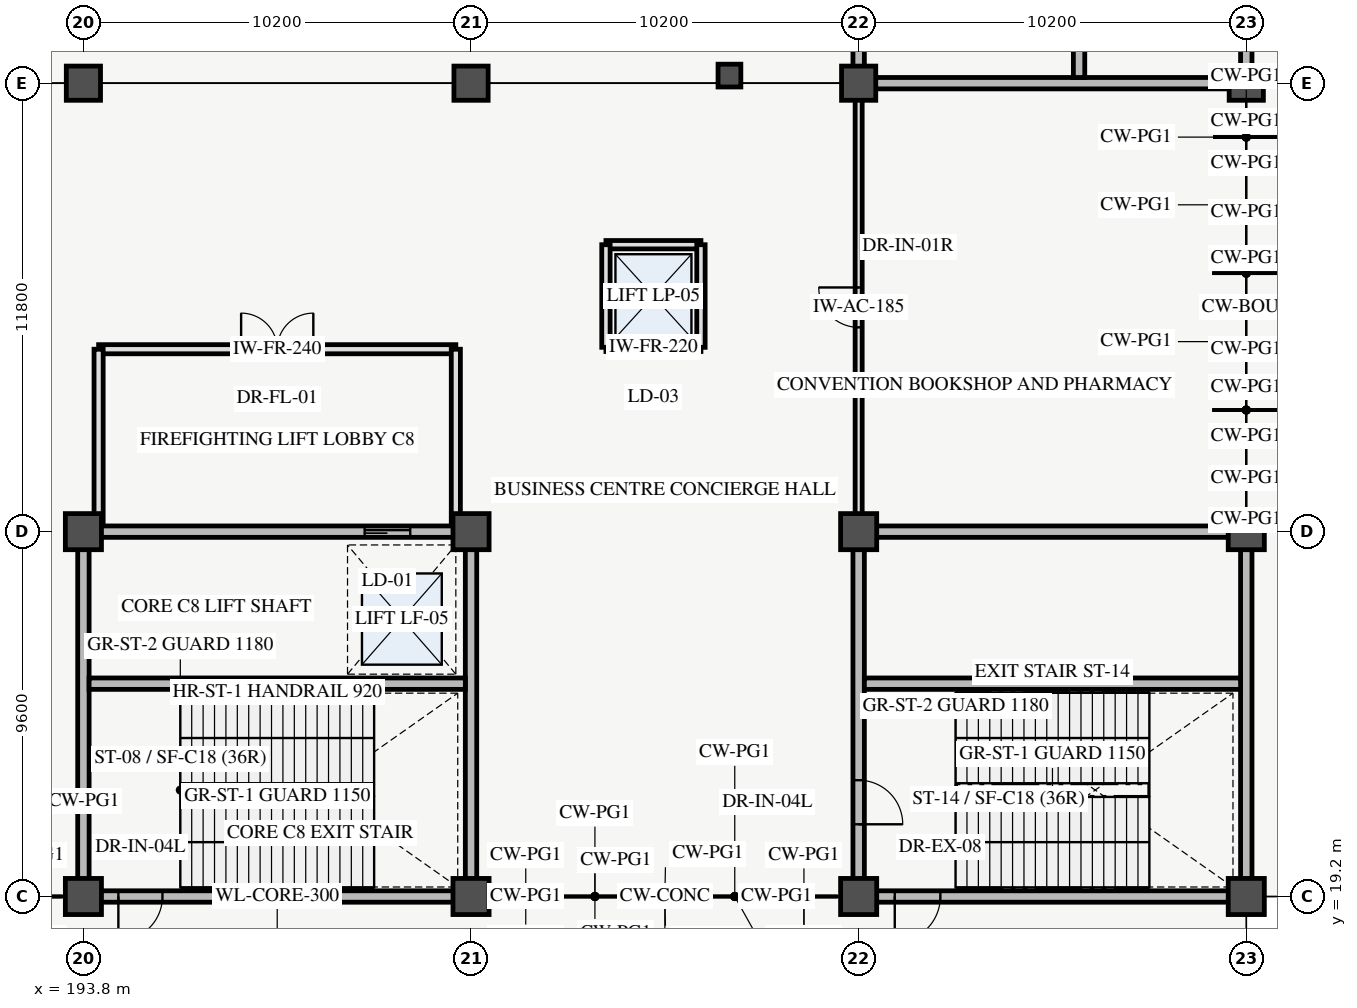
"""IFC4 building model, lengths in metres.
Left out: names, types, materials, properties, quantities, classifications, styles, units other than length and angle.
Written with IfcOpenShell. Run it as: python <this file> out.ifc"""

import sys

from ifc_helpers import new_model, si_unit, direction, frame, frame_2d, origin, origin_2d, place, context, subcontext, project, spatial, rectangle, extrude, element, fill, save


model = new_model("IFC4")
c1 = context("Model", 3, precision=1e-05, world=origin(), true_north=direction((0.0, 1.0)))
c2 = subcontext(c1, "Body", "Model", "MODEL_VIEW")
j1 = project(units=[si_unit("LENGTHUNIT", "METRE"), si_unit("PLANEANGLEUNIT", "RADIAN")], contexts=[c1])
p1 = place(None, origin())
s1 = spatial("IfcSite", under=j1, at=p1, CompositionType="ELEMENT")
p2 = place(p1, origin())
s2 = spatial("IfcBuilding", under=s1, at=p2, CompositionType="ELEMENT")
p3 = place(p2, origin())
s3 = spatial("IfcBuildingStorey", under=s2, at=p3, CompositionType="ELEMENT", Elevation=0.0)
for number, where, z_axis, x_axis in (
    (1, (193.8, 19.2, 0.0), (0.0, 0.0, 1.0), (1.0, 0.0, 0.0)),
    (2, (193.8, 28.8, 0.0), (0.0, 0.0, 1.0), (1.0, 0.0, 0.0)),
):
    element("IfcColumn", number, at=place(p3, frame(where, z_axis=z_axis, x_axis=x_axis)), inside=s3, PredefinedType="COLUMN", context=c2, shape_type="SweptSolid", body=[
        extrude(rectangle(XDim=0.95, YDim=0.95, at=origin_2d()), origin(), (0.0, 0.0, 1.0), 5.4),
    ])
p4 = place(p3, frame((193.8, 40.6, 0.0), z_axis=(0.0, 0.0, 1.0), x_axis=(1.0, 0.0, 0.0)))
e3 = element("IfcColumn", 3, at=p4, inside=s3, PredefinedType="COLUMN", context=c2, shape_type="SweptSolid", body=[
    extrude(rectangle(XDim=0.9, YDim=0.9, at=origin_2d()), origin(), (0.0, 0.0, 1.0), 5.4),
])
for number, where, z_axis, x_axis in (
    (4, (204.0, 19.2, 0.0), (0.0, 0.0, 1.0), (1.0, 0.0, 0.0)),
    (5, (204.0, 28.8, 0.0), (0.0, 0.0, 1.0), (1.0, 0.0, 0.0)),
):
    element("IfcColumn", number, at=place(p3, frame(where, z_axis=z_axis, x_axis=x_axis)), inside=s3, PredefinedType="COLUMN", context=c2, shape_type="SweptSolid", body=[
        extrude(rectangle(XDim=0.95, YDim=0.95, at=origin_2d()), origin(), (0.0, 0.0, 1.0), 5.4),
    ])
p5 = place(p3, frame((204.0, 40.6, 0.0), z_axis=(0.0, 0.0, 1.0), x_axis=(1.0, 0.0, 0.0)))
e6 = element("IfcColumn", 6, at=p5, inside=s3, PredefinedType="COLUMN", context=c2, shape_type="SweptSolid", body=[
    extrude(rectangle(XDim=0.9, YDim=0.9, at=origin_2d()), origin(), (0.0, 0.0, 1.0), 5.4),
])
for number, where, z_axis, x_axis in (
    (7, (214.2, 19.2, 0.0), (0.0, 0.0, 1.0), (1.0, 0.0, 0.0)),
    (8, (214.2, 28.8, 0.0), (0.0, 0.0, 1.0), (1.0, 0.0, 0.0)),
):
    element("IfcColumn", number, at=place(p3, frame(where, z_axis=z_axis, x_axis=x_axis)), inside=s3, PredefinedType="COLUMN", context=c2, shape_type="SweptSolid", body=[
        extrude(rectangle(XDim=0.95, YDim=0.95, at=origin_2d()), origin(), (0.0, 0.0, 1.0), 5.4),
    ])
p6 = place(p3, frame((214.2, 40.6, 0.0), z_axis=(0.0, 0.0, 1.0), x_axis=(1.0, 0.0, 0.0)))
e9 = element("IfcColumn", 9, at=p6, inside=s3, PredefinedType="COLUMN", context=c2, shape_type="SweptSolid", body=[
    extrude(rectangle(XDim=0.9, YDim=0.9, at=origin_2d()), origin(), (0.0, 0.0, 1.0), 5.4),
])
for number, where, z_axis, x_axis in (
    (10, (224.4, 19.2, 0.0), (0.0, 0.0, 1.0), (1.0, 0.0, 0.0)),
    (11, (224.4, 28.8, 0.0), (0.0, 0.0, 1.0), (1.0, 0.0, 0.0)),
):
    element("IfcColumn", number, at=place(p3, frame(where, z_axis=z_axis, x_axis=x_axis)), inside=s3, PredefinedType="COLUMN", context=c2, shape_type="SweptSolid", body=[
        extrude(rectangle(XDim=0.95, YDim=0.95, at=origin_2d()), origin(), (0.0, 0.0, 1.0), 5.4),
    ])
p7 = place(p3, frame((224.4, 40.6, 0.0), z_axis=(0.0, 0.0, 1.0), x_axis=(1.0, 0.0, 0.0)))
e12 = element("IfcColumn", 12, at=p7, inside=s3, PredefinedType="COLUMN", context=c2, shape_type="SweptSolid", body=[
    extrude(rectangle(XDim=0.9, YDim=0.9, at=origin_2d()), origin(), (0.0, 0.0, 1.0), 5.4),
])
p8 = place(p3, frame((193.8, 19.2, 0.0), z_axis=(0.0, 0.0, 1.0), x_axis=(1.0, 0.0, 0.0)))
e13 = element("IfcWall", 13, at=p8, inside=s3, PredefinedType="SHEAR", context=c2, shape_type="SweptSolid", body=[
    extrude(rectangle(XDim=10.2, YDim=0.3, at=frame_2d((5.1, 0.0))), origin(), (0.0, 0.0, 1.0), 5.4),
])
p9 = place(p8, frame((0.92, 0.0, 0.0)))
e14 = element("IfcOpeningElement", 14, at=p9, cuts=e13, PredefinedType="OPENING", context=c2, shape_type="SweptSolid", body=[
    extrude(rectangle(XDim=1.16, YDim=2.2, at=frame_2d((0.58, 1.1))), frame((0.0, 0.16, 0.0), z_axis=(0.0, -1.0, 0.0), x_axis=(1.0, 0.0, 0.0)), (0.0, 0.0, 1.0), 0.32),
])
p10 = place(p3, frame((193.8, 28.8, 0.0), z_axis=(0.0, 0.0, 1.0), x_axis=(1.0, 0.0, 0.0)))
e15 = element("IfcWall", 15, at=p10, inside=s3, PredefinedType="SHEAR", context=c2, shape_type="SweptSolid", body=[
    extrude(rectangle(XDim=10.2, YDim=0.3, at=frame_2d((5.1, 0.0))), origin(), (0.0, 0.0, 1.0), 5.4),
])
p11 = place(p10, frame((7.4, 0.0, 0.0)))
e16 = element("IfcOpeningElement", 16, at=p11, cuts=e15, PredefinedType="OPENING", context=c2, shape_type="SweptSolid", body=[
    extrude(rectangle(XDim=1.2, YDim=2.25, at=frame_2d((0.6, 1.125))), frame((0.0, 0.16, 0.0), z_axis=(0.0, -1.0, 0.0), x_axis=(1.0, 0.0, 0.0)), (0.0, 0.0, 1.0), 0.32),
])
for number, where, z_axis, x_axis in (
    (17, (193.8, 19.2, 0.0), (0.0, 0.0, 1.0), (0.0, 1.0, 0.0)),
    (18, (204.0, 19.2, 0.0), (0.0, 0.0, 1.0), (0.0, 1.0, 0.0)),
):
    element("IfcWall", number, at=place(p3, frame(where, z_axis=z_axis, x_axis=x_axis)), inside=s3, PredefinedType="SHEAR", context=c2, shape_type="SweptSolid", body=[
        extrude(rectangle(XDim=9.6, YDim=0.3, at=frame_2d((4.8, 0.0))), origin(), (0.0, 0.0, 1.0), 5.4),
    ])
p12 = place(p3, frame((210.8, 40.8, 0.0), z_axis=(0.0, 0.0, 1.0), x_axis=(1.0, 0.0, 0.0)))
e19 = element("IfcColumn", 19, at=p12, inside=s3, PredefinedType="COLUMN", context=c2, shape_type="SweptSolid", body=[
    extrude(rectangle(XDim=0.6, YDim=0.6, at=origin_2d()), origin(), (0.0, 0.0, 1.0), 5.08),
])
p13 = place(p3, frame((193.95, 24.8, 0.0), z_axis=(0.0, 0.0, 1.0), x_axis=(1.0, 0.0, 0.0)))
e20 = element("IfcWall", 20, at=p13, inside=s3, PredefinedType="SHEAR", context=c2, shape_type="SweptSolid", body=[
    extrude(rectangle(XDim=9.9, YDim=0.3, at=frame_2d((4.95, 0.0))), origin(), (0.0, 0.0, 1.0), 5.4),
])
p14 = place(p3, frame((214.2, 19.2, 0.0), z_axis=(0.0, 0.0, 1.0), x_axis=(1.0, 0.0, 0.0)))
e21 = element("IfcWall", 21, at=p14, inside=s3, PredefinedType="SHEAR", context=c2, shape_type="SweptSolid", body=[
    extrude(rectangle(XDim=10.2, YDim=0.3, at=frame_2d((5.1, 0.0))), origin(), (0.0, 0.0, 1.0), 5.4),
])
p15 = place(p14, frame((0.95, 0.0, 0.0)))
e22 = element("IfcOpeningElement", 22, at=p15, cuts=e21, PredefinedType="OPENING", context=c2, shape_type="SweptSolid", body=[
    extrude(rectangle(XDim=1.2, YDim=2.2, at=frame_2d((0.6, 1.1))), frame((0.0, 0.16, 0.0), z_axis=(0.0, -1.0, 0.0), x_axis=(1.0, 0.0, 0.0)), (0.0, 0.0, 1.0), 0.32),
])
p16 = place(p3, frame((214.2, 28.8, 0.0), z_axis=(0.0, 0.0, 1.0), x_axis=(1.0, 0.0, 0.0)))
e23 = element("IfcWall", 23, at=p16, inside=s3, PredefinedType="SHEAR", context=c2, shape_type="SweptSolid", body=[
    extrude(rectangle(XDim=10.2, YDim=0.3, at=frame_2d((5.1, 0.0))), origin(), (0.0, 0.0, 1.0), 5.4),
])
p17 = place(p3, frame((214.2, 19.2, 0.0), z_axis=(0.0, 0.0, 1.0), x_axis=(0.0, 1.0, 0.0)))
e24 = element("IfcWall", 24, at=p17, inside=s3, PredefinedType="SHEAR", context=c2, shape_type="SweptSolid", body=[
    extrude(rectangle(XDim=9.6, YDim=0.3, at=frame_2d((4.8, 0.0))), origin(), (0.0, 0.0, 1.0), 5.4),
])
p18 = place(p17, frame((1.9, 0.0, 0.0)))
e25 = element("IfcOpeningElement", 25, at=p18, cuts=e24, PredefinedType="OPENING", context=c2, shape_type="SweptSolid", body=[
    extrude(rectangle(XDim=1.16, YDim=2.2, at=frame_2d((0.58, 1.1))), frame((0.0, 0.16, 0.0), z_axis=(0.0, -1.0, 0.0), x_axis=(1.0, 0.0, 0.0)), (0.0, 0.0, 1.0), 0.32),
])
p19 = place(p3, frame((224.4, 19.2, 0.0), z_axis=(0.0, 0.0, 1.0), x_axis=(0.0, 1.0, 0.0)))
e26 = element("IfcWall", 26, at=p19, inside=s3, PredefinedType="SHEAR", context=c2, shape_type="SweptSolid", body=[
    extrude(rectangle(XDim=9.6, YDim=0.3, at=frame_2d((4.8, 0.0))), origin(), (0.0, 0.0, 1.0), 5.4),
])
p20 = place(p3, frame((214.35, 24.8, 0.0), z_axis=(0.0, 0.0, 1.0), x_axis=(1.0, 0.0, 0.0)))
e27 = element("IfcWall", 27, at=p20, inside=s3, PredefinedType="SHEAR", context=c2, shape_type="SweptSolid", body=[
    extrude(rectangle(XDim=9.9, YDim=0.3, at=frame_2d((4.95, 0.0))), origin(), (0.0, 0.0, 1.0), 5.4),
])
p21 = place(p3, frame((214.2, 40.6, 0.0), z_axis=(0.0, 0.0, 1.0), x_axis=(1.0, 0.0, 0.0)))
e28 = element("IfcWall", 28, at=p21, inside=s3, PredefinedType="SHEAR", context=c2, shape_type="SweptSolid", body=[
    extrude(rectangle(XDim=10.2, YDim=0.3, at=frame_2d((5.1, 0.0))), origin(), (0.0, 0.0, 1.0), 5.4),
])
p22 = place(p3, frame((214.2, 40.6, 0.0), z_axis=(0.0, 0.0, 1.0), x_axis=(0.0, 1.0, 0.0)))
e29 = element("IfcWall", 29, at=p22, inside=s3, PredefinedType="SHEAR", context=c2, shape_type="SweptSolid", body=[
    extrude(rectangle(XDim=11.8, YDim=0.3, at=frame_2d((5.9, 0.0))), origin(), (0.0, 0.0, 1.0), 5.4),
])
p23 = place(p22, frame((0.92, 0.0, 0.0)))
e30 = element("IfcOpeningElement", 30, at=p23, cuts=e29, PredefinedType="OPENING", context=c2, shape_type="SweptSolid", body=[
    extrude(rectangle(XDim=1.16, YDim=2.2, at=frame_2d((0.58, 1.1))), frame((0.0, 0.16, 0.0), z_axis=(0.0, -1.0, 0.0), x_axis=(1.0, 0.0, 0.0)), (0.0, 0.0, 1.0), 0.32),
])
p24 = place(p3, frame((224.4, 40.6, 0.0), z_axis=(0.0, 0.0, 1.0), x_axis=(0.0, 1.0, 0.0)))
e31 = element("IfcWall", 31, at=p24, inside=s3, PredefinedType="SHEAR", context=c2, shape_type="SweptSolid", body=[
    extrude(rectangle(XDim=11.8, YDim=0.3, at=frame_2d((5.9, 0.0))), origin(), (0.0, 0.0, 1.0), 5.4),
])
p25 = place(p24, frame((0.92, 0.0, 0.0)))
e32 = element("IfcOpeningElement", 32, at=p25, cuts=e31, PredefinedType="OPENING", context=c2, shape_type="SweptSolid", body=[
    extrude(rectangle(XDim=1.2, YDim=2.2, at=frame_2d((0.6, 1.1))), frame((0.0, 0.16, 0.0), z_axis=(0.0, -1.0, 0.0), x_axis=(1.0, 0.0, 0.0)), (0.0, 0.0, 1.0), 0.32),
])
p26 = place(p3, frame((220.0, 40.75, 0.0), z_axis=(0.0, 0.0, 1.0), x_axis=(0.0, 1.0, 0.0)))
e33 = element("IfcWall", 33, at=p26, inside=s3, PredefinedType="SHEAR", context=c2, shape_type="SweptSolid", body=[
    extrude(rectangle(XDim=11.5, YDim=0.3, at=frame_2d((5.75, 0.0))), origin(), (0.0, 0.0, 1.0), 5.4),
])
p27 = place(p3, frame((207.55, 33.65, 0.0), z_axis=(0.0, 0.0, 1.0), x_axis=(1.0, 0.0, 0.0)))
e34 = element("IfcWall", 34, at=p27, inside=s3, PredefinedType="PARTITIONING", context=c2, shape_type="SweptSolid", body=[
    extrude(rectangle(XDim=2.5, YDim=0.22, at=frame_2d((1.25, 0.0))), origin(), (0.0, 0.0, 1.0), 5.08),
])
p28 = place(p27, frame((0.575, 0.0, 0.0)))
e35 = element("IfcOpeningElement", 35, at=p28, cuts=e34, PredefinedType="OPENING", context=c2, shape_type="SweptSolid", body=[
    extrude(rectangle(XDim=1.35, YDim=2.3, at=frame_2d((0.675, 1.15))), frame((0.0, 0.12, 0.0), z_axis=(0.0, -1.0, 0.0), x_axis=(1.0, 0.0, 0.0)), (0.0, 0.0, 1.0), 0.24),
])
p29 = place(p3, frame((207.55, 36.35, 0.0), z_axis=(0.0, 0.0, 1.0), x_axis=(1.0, 0.0, 0.0)))
e36 = element("IfcWall", 36, at=p29, inside=s3, PredefinedType="PARTITIONING", context=c2, shape_type="SweptSolid", body=[
    extrude(rectangle(XDim=2.5, YDim=0.22, at=frame_2d((1.25, 0.0))), origin(), (0.0, 0.0, 1.0), 5.08),
])
for number, where, z_axis, x_axis in (
    (37, (207.55, 33.65, 0.0), (0.0, 0.0, 1.0), (0.0, 1.0, 0.0)),
    (38, (210.05, 33.65, 0.0), (0.0, 0.0, 1.0), (0.0, 1.0, 0.0)),
):
    element("IfcWall", number, at=place(p3, frame(where, z_axis=z_axis, x_axis=x_axis)), inside=s3, PredefinedType="PARTITIONING", context=c2, shape_type="SweptSolid", body=[
        extrude(rectangle(XDim=2.7, YDim=0.22, at=frame_2d((1.35, 0.0))), origin(), (0.0, 0.0, 1.0), 5.08),
    ])
p30 = place(p3, frame((194.2, 33.6, 0.0), z_axis=(0.0, 0.0, 1.0), x_axis=(1.0, 0.0, 0.0)))
e39 = element("IfcWall", 39, at=p30, inside=s3, PredefinedType="PARTITIONING", context=c2, shape_type="SweptSolid", body=[
    extrude(rectangle(XDim=9.4, YDim=0.24, at=frame_2d((4.7, 0.0))), origin(), (0.0, 0.0, 1.0), 4.08),
])
p31 = place(p30, frame((3.75, 0.0, 0.0)))
e40 = element("IfcOpeningElement", 40, at=p31, cuts=e39, PredefinedType="OPENING", context=c2, shape_type="SweptSolid", body=[
    extrude(rectangle(XDim=1.9, YDim=2.25, at=frame_2d((0.95, 1.125))), frame((0.0, 0.13, 0.0), z_axis=(0.0, -1.0, 0.0), x_axis=(1.0, 0.0, 0.0)), (0.0, 0.0, 1.0), 0.26),
])
for number, where, z_axis, x_axis in (
    (41, (203.6, 29.0, 0.0), (0.0, 0.0, 1.0), (0.0, 1.0, 0.0)),
    (42, (194.2, 29.0, 0.0), (0.0, 0.0, 1.0), (0.0, 1.0, 0.0)),
):
    element("IfcWall", number, at=place(p3, frame(where, z_axis=z_axis, x_axis=x_axis)), inside=s3, PredefinedType="PARTITIONING", context=c2, shape_type="SweptSolid", body=[
        extrude(rectangle(XDim=4.6, YDim=0.24, at=frame_2d((2.3, 0.0))), origin(), (0.0, 0.0, 1.0), 4.08),
    ])
p32 = place(p3, frame((214.2, 29.2, 0.0), z_axis=(0.0, 0.0, 1.0), x_axis=(0.0, 1.0, 0.0)))
e43 = element("IfcWall", 43, at=p32, inside=s3, PredefinedType="PARTITIONING", context=c2, shape_type="SweptSolid", body=[
    extrude(rectangle(XDim=11.0, YDim=0.185, at=frame_2d((5.5, 0.0))), origin(), (0.0, 0.0, 1.0), 4.08),
])
p33 = place(p32, frame((4.975, 0.0, 0.0)))
e44 = element("IfcOpeningElement", 44, at=p33, cuts=e43, PredefinedType="OPENING", context=c2, shape_type="SweptSolid", body=[
    extrude(rectangle(XDim=1.05, YDim=2.15, at=frame_2d((0.525, 1.075))), frame((0.0, 0.103, 0.0), z_axis=(0.0, -1.0, 0.0), x_axis=(1.0, 0.0, 0.0)), (0.0, 0.0, 1.0), 0.205),
])
p34 = place(p9, frame((1.16, 0.0, 0.0), z_axis=(0.0, 0.0, 1.0), x_axis=(-1.0, 0.0, 0.0)))
e45 = element("IfcDoor", 45, at=p34, inside=s3, OperationType="SINGLE_SWING_LEFT", PredefinedType="DOOR", context=c2, shape_type="SweptSolid", body=[
    extrude(rectangle(XDim=1.16, YDim=2.2, at=frame_2d((0.58, 1.1))), frame((0.0, 0.025, 0.0), z_axis=(0.0, -1.0, 0.0), x_axis=(1.0, 0.0, 0.0)), (0.0, 0.0, 1.0), 0.05),
])
fill(e14, e45)
p35 = place(p11, origin())
e46 = element("IfcDoor", 46, at=p35, inside=s3, OperationType="SLIDING_TO_LEFT", PredefinedType="DOOR", context=c2, shape_type="SweptSolid", body=[
    extrude(rectangle(XDim=1.2, YDim=2.25, at=frame_2d((0.6, 1.125))), frame((0.0, 0.025, 0.0), z_axis=(0.0, -1.0, 0.0), x_axis=(1.0, 0.0, 0.0)), (0.0, 0.0, 1.0), 0.05),
])
fill(e16, e46)
p36 = place(p18, origin())
e47 = element("IfcDoor", 47, at=p36, inside=s3, OperationType="SINGLE_SWING_LEFT", PredefinedType="DOOR", context=c2, shape_type="SweptSolid", body=[
    extrude(rectangle(XDim=1.16, YDim=2.2, at=frame_2d((0.58, 1.1))), frame((0.0, 0.025, 0.0), z_axis=(0.0, -1.0, 0.0), x_axis=(1.0, 0.0, 0.0)), (0.0, 0.0, 1.0), 0.05),
])
fill(e25, e47)
p37 = place(p15, frame((1.2, 0.0, 0.0), z_axis=(0.0, 0.0, 1.0), x_axis=(-1.0, 0.0, 0.0)))
e48 = element("IfcDoor", 48, at=p37, inside=s3, OperationType="SINGLE_SWING_LEFT", PredefinedType="DOOR", context=c2, shape_type="SweptSolid", body=[
    extrude(rectangle(XDim=1.2, YDim=2.2, at=frame_2d((0.6, 1.1))), frame((0.0, 0.025, 0.0), z_axis=(0.0, -1.0, 0.0), x_axis=(1.0, 0.0, 0.0)), (0.0, 0.0, 1.0), 0.05),
])
fill(e22, e48)
p38 = place(p28, origin())
e49 = element("IfcDoor", 49, at=p38, inside=s3, OperationType="DOUBLE_DOOR_SLIDING", PredefinedType="DOOR", context=c2, shape_type="SweptSolid", body=[
    extrude(rectangle(XDim=1.35, YDim=2.3, at=frame_2d((0.675, 1.15))), frame((0.0, 0.025, 0.0), z_axis=(0.0, -1.0, 0.0), x_axis=(1.0, 0.0, 0.0)), (0.0, 0.0, 1.0), 0.05),
])
fill(e35, e49)
p39 = place(p31, origin())
e50 = element("IfcDoor", 50, at=p39, inside=s3, OperationType="DOUBLE_DOOR_SINGLE_SWING", PredefinedType="DOOR", context=c2, shape_type="SweptSolid", body=[
    extrude(rectangle(XDim=1.9, YDim=2.25, at=frame_2d((0.95, 1.125))), frame((0.0, 0.025, 0.0), z_axis=(0.0, -1.0, 0.0), x_axis=(1.0, 0.0, 0.0)), (0.0, 0.0, 1.0), 0.05),
])
fill(e40, e50)
p40 = place(p33, origin())
e51 = element("IfcDoor", 51, at=p40, inside=s3, OperationType="SINGLE_SWING_RIGHT", PredefinedType="DOOR", context=c2, shape_type="SweptSolid", body=[
    extrude(rectangle(XDim=1.05, YDim=2.15, at=frame_2d((0.525, 1.075))), frame((0.0, 0.025, 0.0), z_axis=(0.0, -1.0, 0.0), x_axis=(1.0, 0.0, 0.0)), (0.0, 0.0, 1.0), 0.05),
])
fill(e44, e51)
save(model, sys.argv[1])
